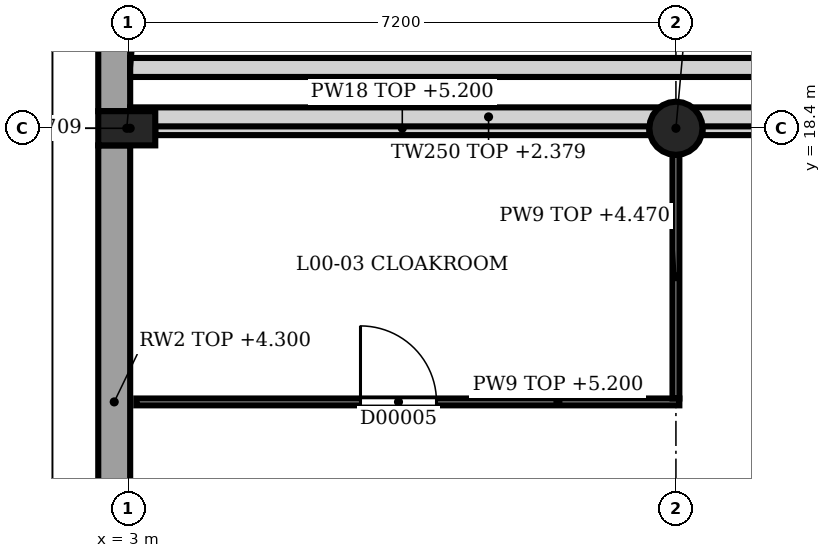
"""IFC4 building model, lengths in metres.
Left out: names, types, materials, properties, quantities, classifications, styles, units other than length and angle.
Written with IfcOpenShell. Run it as: python <this file> out.ifc"""

import sys

from ifc_helpers import new_model, si_unit, direction, frame, frame_2d, origin, origin_2d, place, context, subcontext, project, spatial, rectangle, circle, extrude, element, fill, save


model = new_model("IFC4")
c1 = context("Model", 3, precision=1e-05, world=origin(), true_north=direction((0.0, 1.0)))
c2 = subcontext(c1, "Body", "Model", "MODEL_VIEW")
j1 = project(units=[si_unit("LENGTHUNIT", "METRE"), si_unit("PLANEANGLEUNIT", "RADIAN")], contexts=[c1])
p1 = place(None, origin())
s1 = spatial("IfcSite", under=j1, at=p1, CompositionType="ELEMENT")
p2 = place(p1, origin())
s2 = spatial("IfcBuilding", under=s1, at=p2, CompositionType="ELEMENT")
p3 = place(p2, origin())
s3 = spatial("IfcBuildingStorey", under=s2, at=p3, CompositionType="ELEMENT", Elevation=0.0)
p4 = place(p3, frame((2.975, 18.4, -0.55), z_axis=(0.0, 0.0, 1.0), x_axis=(1.0, 0.0, 0.0)))
e1 = element("IfcColumn", 1, at=p4, inside=s3, PredefinedType="COLUMN", context=c2, shape_type="SweptSolid", body=[
    extrude(rectangle(XDim=0.75, YDim=0.45, at=origin_2d()), origin(), (0.0, 0.0, 1.0), 5.95),
])
p5 = place(p3, frame((10.2, 18.4, -0.55), z_axis=(0.0, 0.0, 1.0), x_axis=(1.0, 0.0, 0.0)))
e2 = element("IfcColumn", 2, at=p5, inside=s3, PredefinedType="COLUMN", context=c2, shape_type="SweptSolid", body=[
    extrude(circle(Radius=0.35, at=origin_2d()), origin(), (0.0, 0.0, 1.0), 5.95),
])
p6 = place(p3, frame((3.02, 19.2, 0.0), z_axis=(0.0, 0.0, 1.0), x_axis=(1.0, 0.0, 0.0)))
e3 = element("IfcWall", 3, at=p6, inside=s3, PredefinedType="SOLIDWALL", context=c2, shape_type="SweptSolid", body=[
    extrude(rectangle(XDim=24.88, YDim=0.25, at=frame_2d((12.44, 0.0))), origin(), (0.0, 0.0, 1.0), 2.271),
])
p7 = place(p3, frame((3.02, 18.55, 0.0), z_axis=(0.0, 0.0, 1.0), x_axis=(1.0, 0.0, 0.0)))
e4 = element("IfcWall", 4, at=p7, inside=s3, PredefinedType="SOLIDWALL", context=c2, shape_type="SweptSolid", body=[
    extrude(rectangle(XDim=9.43, YDim=0.25, at=frame_2d((4.715, 0.0))), origin(), (0.0, 0.0, 1.0), 2.379),
])
p8 = place(p3, frame((2.81, 11.425, 0.0), z_axis=(0.0, 0.0, 1.0), x_axis=(0.0, 1.0, 0.0)))
e5 = element("IfcWall", 5, at=p8, inside=s3, PredefinedType="SOLIDWALL", context=c2, shape_type="SweptSolid", body=[
    extrude(rectangle(XDim=6.75, YDim=0.42, at=frame_2d((3.375, 0.0))), origin(), (0.0, 0.0, 1.0), 4.3),
])
p9 = place(p3, frame((2.81, 18.625, 0.0), z_axis=(0.0, 0.0, 1.0), x_axis=(0.0, 1.0, 0.0)))
e6 = element("IfcWall", 6, at=p9, inside=s3, PredefinedType="SOLIDWALL", context=c2, shape_type="SweptSolid", body=[
    extrude(rectangle(XDim=6.75, YDim=0.42, at=frame_2d((3.375, 0.0))), origin(), (0.0, 0.0, 1.0), 5.4),
])
p10 = place(p3, frame((3.1, 14.8, 0.0), z_axis=(0.0, 0.0, 1.0), x_axis=(1.0, 0.0, 0.0)))
e7 = element("IfcWall", 7, at=p10, inside=s3, PredefinedType="PARTITIONING", context=c2, shape_type="SweptSolid", body=[
    extrude(rectangle(XDim=7.145, YDim=0.09, at=frame_2d((3.573, 0.0))), origin(), (0.0, 0.0, 1.0), 5.2),
])
p11 = place(p10, frame((2.95, 0.0, 0.0)))
e8 = element("IfcOpeningElement", 8, at=p11, cuts=e7, PredefinedType="OPENING", context=c2, shape_type="SweptSolid", body=[
    extrude(rectangle(XDim=1.0, YDim=2.1, at=frame_2d((0.5, 1.05))), frame((0.0, 0.055, 0.0), z_axis=(0.0, -1.0, 0.0), x_axis=(1.0, 0.0, 0.0)), (0.0, 0.0, 1.0), 0.11),
])
p12 = place(p3, frame((3.35, 18.4, 0.0), z_axis=(0.0, 0.0, 1.0), x_axis=(1.0, 0.0, 0.0)))
e9 = element("IfcWall", 9, at=p12, inside=s3, PredefinedType="PARTITIONING", context=c2, shape_type="SweptSolid", body=[
    extrude(rectangle(XDim=6.5, YDim=0.18, at=frame_2d((3.25, 0.0))), origin(), (0.0, 0.0, 1.0), 5.2),
])
p13 = place(p3, frame((17.05, 18.4, 0.0), z_axis=(0.0, 0.0, 1.0), x_axis=(-1.0, 0.0, 0.0)))
e10 = element("IfcWall", 10, at=p13, inside=s3, PredefinedType="PARTITIONING", context=c2, shape_type="SweptSolid", body=[
    extrude(rectangle(XDim=6.5, YDim=0.18, at=frame_2d((3.25, 0.0))), origin(), (0.0, 0.0, 1.0), 5.2),
])
p14 = place(p13, frame((2.4, 0.0, 0.0)))
e11 = element("IfcOpeningElement", 11, at=p14, cuts=e10, PredefinedType="OPENING", context=c2, shape_type="SweptSolid", body=[
    extrude(rectangle(XDim=1.8, YDim=2.2, at=frame_2d((0.9, 1.1))), frame((0.0, 0.1, 0.0), z_axis=(0.0, -1.0, 0.0), x_axis=(1.0, 0.0, 0.0)), (0.0, 0.0, 1.0), 0.2),
])
p15 = place(p3, frame((10.2, 14.845, 0.0), z_axis=(0.0, 0.0, 1.0), x_axis=(0.0, 1.0, 0.0)))
e12 = element("IfcWall", 12, at=p15, inside=s3, PredefinedType="PARTITIONING", context=c2, shape_type="SweptSolid", body=[
    extrude(rectangle(XDim=3.205, YDim=0.09, at=frame_2d((1.603, 0.0))), origin(), (0.0, 0.0, 1.0), 4.47),
])
p16 = place(p11, origin())
e13 = element("IfcDoor", 13, at=p16, inside=s3, OperationType="SINGLE_SWING_LEFT", PredefinedType="DOOR", context=c2, shape_type="SweptSolid", body=[
    extrude(rectangle(XDim=1.0, YDim=2.1, at=frame_2d((0.5, 1.05))), frame((0.0, 0.025, 0.0), z_axis=(0.0, -1.0, 0.0), x_axis=(1.0, 0.0, 0.0)), (0.0, 0.0, 1.0), 0.05),
])
fill(e8, e13)
save(model, sys.argv[1])
